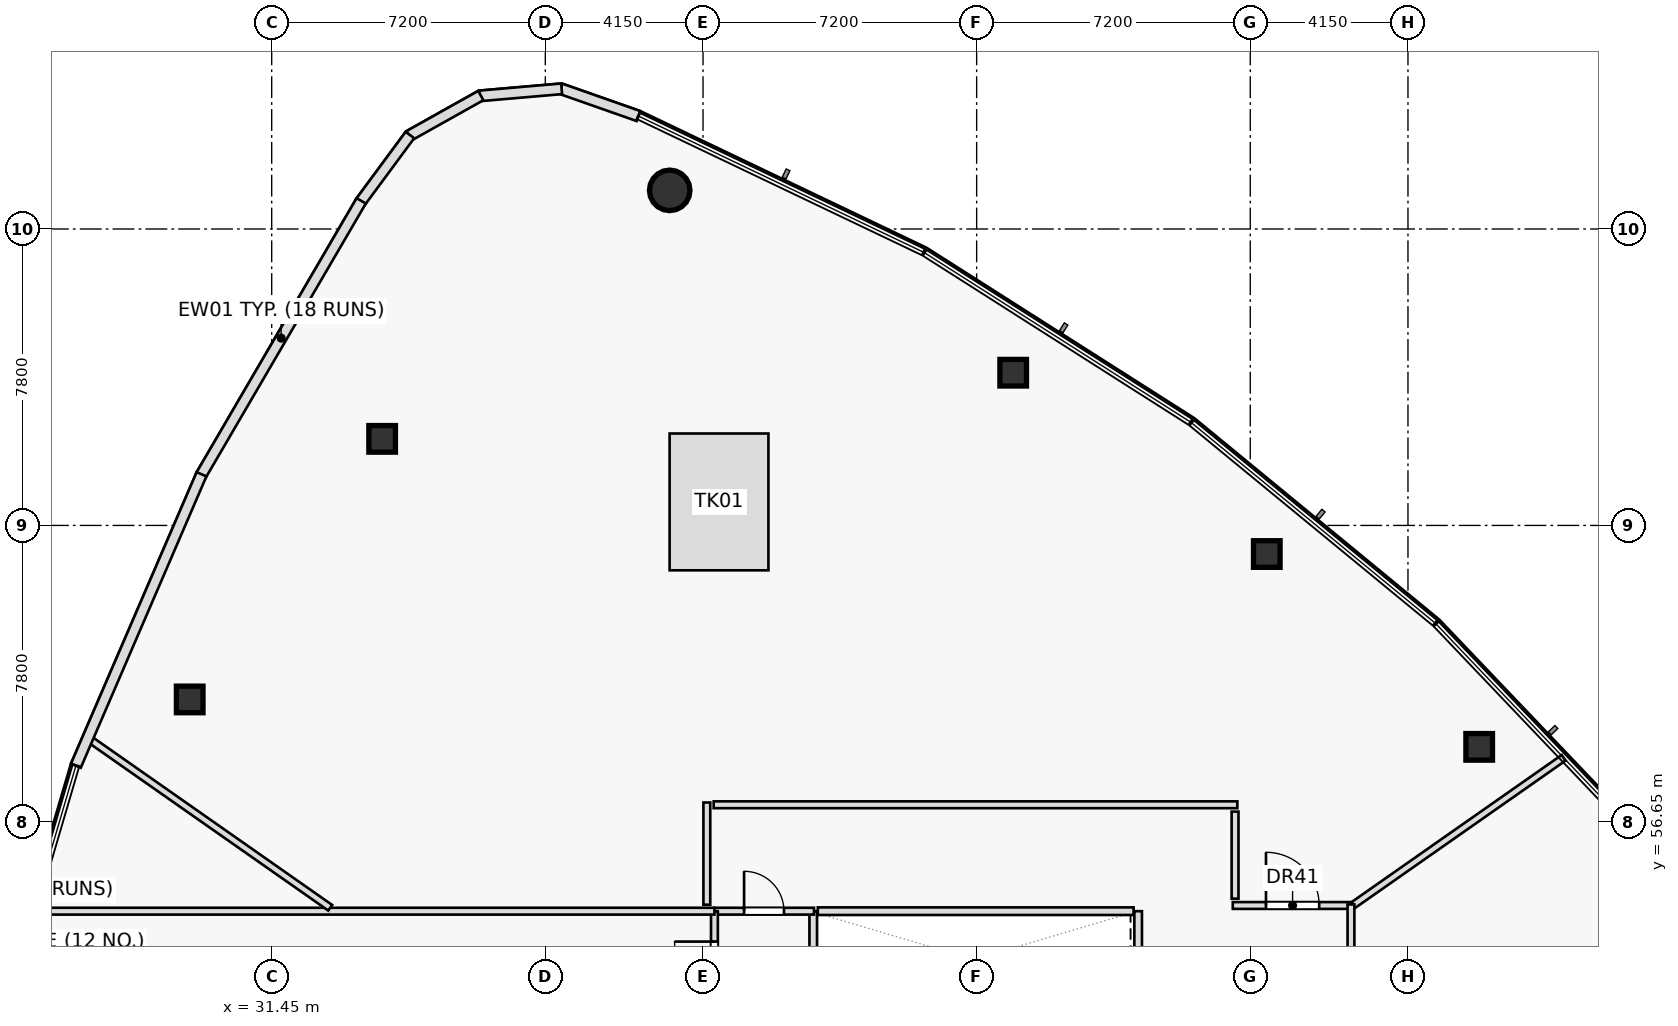
"""IFC4 building model, lengths in metres.
Left out: names, types, materials, properties, quantities, classifications, styles, units other than length and angle.
Written with IfcOpenShell. Run it as: python <this file> out.ifc"""

import sys

from ifc_helpers import new_model, si_unit, direction, frame, frame_2d, origin, origin_2d, place, context, subcontext, project, spatial, rectangle, hollow_rectangle, hollow_circle, extrude, element, fill, save


model = new_model("IFC4")
c1 = context("Model", 3, precision=1e-05, world=origin(), true_north=direction((0.0, 1.0)))
c2 = subcontext(c1, "Body", "Model", "MODEL_VIEW")
j1 = project(units=[si_unit("LENGTHUNIT", "METRE"), si_unit("PLANEANGLEUNIT", "RADIAN")], contexts=[c1])
p1 = place(None, origin())
s1 = spatial("IfcSite", under=j1, at=p1, CompositionType="ELEMENT")
p2 = place(p1, origin())
s2 = spatial("IfcBuilding", under=s1, at=p2, CompositionType="ELEMENT")
p3 = place(p2, frame((0.0, 0.0, 97.8)))
s3 = spatial("IfcBuildingStorey", under=s2, at=p3, CompositionType="ELEMENT", Elevation=97.8)
p4 = place(p3, frame((41.923, 73.266, 0.0), z_axis=(0.0, 0.0, 1.0), x_axis=(1.0, 0.0, 0.0)))
e1 = element("IfcColumn", 1, at=p4, inside=s3, PredefinedType="COLUMN", context=c2, shape_type="SweptSolid", body=[
    extrude(hollow_circle(Radius=0.533, WallThickness=0.045, at=origin_2d()), origin(), (0.0, 0.0, 1.0), 4.55),
])
for number, where, z_axis, x_axis in (
    (2, (34.356, 66.728, 0.0), (0.0, 0.0, 1.0), (1.0, 0.0, 0.0)),
    (3, (29.292, 59.872, 0.0), (0.0, 0.0, 1.0), (1.0, 0.0, 0.0)),
):
    element("IfcColumn", number, at=place(p3, frame(where, z_axis=z_axis, x_axis=x_axis)), inside=s3, PredefinedType="COLUMN", context=c2, shape_type="SweptSolid", body=[
        extrude(hollow_rectangle(XDim=0.7, YDim=0.7, WallThickness=0.04, at=origin_2d()), origin(), (0.0, 0.0, 1.0), 5.0),
    ])
for number, where, z_axis, x_axis in (
    (4, (63.224, 58.624, 0.0), (0.0, 0.0, 1.0), (1.0, 0.0, 0.0)),
    (5, (57.635, 63.698, 0.0), (0.0, 0.0, 1.0), (1.0, 0.0, 0.0)),
    (6, (50.962, 68.469, 0.0), (0.0, 0.0, 1.0), (1.0, 0.0, 0.0)),
):
    element("IfcColumn", number, at=place(p3, frame(where, z_axis=z_axis, x_axis=x_axis)), inside=s3, PredefinedType="COLUMN", context=c2, shape_type="SweptSolid", body=[
        extrude(hollow_rectangle(XDim=0.7, YDim=0.7, WallThickness=0.04, at=origin_2d()), origin(), (0.0, 0.0, 1.0), 4.55),
    ])
for number, where, z_axis, x_axis in (
    (7, (45.7, 51.8, 0.0), (0.0, 0.0, 1.0), (0.0, 1.0, 0.0)),
    (8, (54.25, 51.8, 0.0), (0.0, 0.0, 1.0), (0.0, 1.0, 0.0)),
):
    element("IfcWall", number, at=place(p3, frame(where, z_axis=z_axis, x_axis=x_axis)), inside=s3, PredefinedType="PARTITIONING", context=c2, shape_type="SweptSolid", body=[
        extrude(rectangle(XDim=2.5, YDim=0.2, at=frame_2d((1.25, 0.0))), origin(), (0.0, 0.0, 1.0), 4.55),
    ])
p5 = place(p3, frame((43.1, 54.3, 0.0), z_axis=(0.0, 0.0, 1.0), x_axis=(1.0, 0.0, 0.0)))
e9 = element("IfcWall", 9, at=p5, inside=s3, PredefinedType="PARTITIONING", context=c2, shape_type="SweptSolid", body=[
    extrude(rectangle(XDim=2.62, YDim=0.18, at=frame_2d((1.31, 0.0))), origin(), (0.0, 0.0, 1.0), 4.55),
])
p6 = place(p5, frame((0.78, 0.0, 0.0)))
e10 = element("IfcOpeningElement", 10, at=p6, cuts=e9, PredefinedType="OPENING", context=c2, shape_type="SweptSolid", body=[
    extrude(rectangle(XDim=1.05, YDim=2.2, at=frame_2d((0.525, 1.1))), frame((0.0, 0.1, 0.0), z_axis=(0.0, -1.0, 0.0), x_axis=(1.0, 0.0, 0.0)), (0.0, 0.0, 1.0), 0.2),
])
p7 = place(p3, frame((43.1, 51.8, 0.0), z_axis=(0.0, 0.0, 1.0), x_axis=(0.0, 1.0, 0.0)))
e11 = element("IfcWall", 11, at=p7, inside=s3, PredefinedType="PARTITIONING", context=c2, shape_type="SweptSolid", body=[
    extrude(rectangle(XDim=2.5, YDim=0.18, at=frame_2d((1.25, 0.0))), origin(), (0.0, 0.0, 1.0), 3.925),
])
p8 = place(p7, frame((0.65, 0.0, 0.0)))
e12 = element("IfcOpeningElement", 12, at=p8, cuts=e11, PredefinedType="OPENING", context=c2, shape_type="SweptSolid", body=[
    extrude(rectangle(XDim=1.05, YDim=2.2, at=frame_2d((0.525, 1.1))), frame((0.0, 0.1, 0.0), z_axis=(0.0, -1.0, 0.0), x_axis=(1.0, 0.0, 0.0)), (0.0, 0.0, 1.0), 0.2),
])
p9 = place(p3, frame((25.173, 54.3, 0.0), z_axis=(0.0, 0.0, 1.0), x_axis=(1.0, 0.0, 0.0)))
e13 = element("IfcWall", 13, at=p9, inside=s3, PredefinedType="PARTITIONING", context=c2, shape_type="SweptSolid", body=[
    extrude(rectangle(XDim=17.927, YDim=0.18, at=frame_2d((8.964, 0.0))), origin(), (0.0, 0.0, 1.0), 3.925),
])
p10 = place(p3, frame((59.85, 54.418, 0.0), z_axis=(0.0, 0.0, 1.0), x_axis=(0.819142926279, 0.573589457998, 0.0)))
e14 = element("IfcWall", 14, at=p10, inside=s3, PredefinedType="PARTITIONING", context=c2, shape_type="SweptSolid", body=[
    extrude(rectangle(XDim=6.832, YDim=0.18, at=frame_2d((3.416, 0.0))), origin(), (0.0, 0.0, 1.0), 3.975),
])
p11 = place(p3, frame((32.99, 54.39, 0.0), z_axis=(0.0, 0.0, 1.0), x_axis=(-0.819142061869, 0.57359069246, 0.0)))
e15 = element("IfcWall", 15, at=p11, inside=s3, PredefinedType="PARTITIONING", context=c2, shape_type="SweptSolid", body=[
    extrude(rectangle(XDim=7.787, YDim=0.18, at=frame_2d((3.894, 0.0))), origin(), (0.0, 0.0, 1.0), 3.975),
])
p12 = place(p3, frame((56.74, 54.45, 0.0), z_axis=(0.0, 0.0, 1.0), x_axis=(1.0, 0.0, 0.0)))
e16 = element("IfcWall", 16, at=p12, inside=s3, PredefinedType="PARTITIONING", context=c2, shape_type="SweptSolid", body=[
    extrude(rectangle(XDim=3.147, YDim=0.18, at=frame_2d((1.574, 0.0))), origin(), (0.0, 0.0, 1.0), 3.925),
])
p13 = place(p12, frame((0.874, 0.0, 0.0)))
e17 = element("IfcOpeningElement", 17, at=p13, cuts=e16, PredefinedType="OPENING", context=c2, shape_type="SweptSolid", body=[
    extrude(rectangle(XDim=1.4, YDim=2.15, at=frame_2d((0.7, 1.075))), frame((0.0, 0.1, 0.0), z_axis=(0.0, -1.0, 0.0), x_axis=(1.0, 0.0, 0.0)), (0.0, 0.0, 1.0), 0.2),
])
p14 = place(p3, frame((59.85, 54.478, 0.0), z_axis=(0.0, 0.0, 1.0), x_axis=(0.0, -1.0, 0.0)))
e18 = element("IfcWall", 18, at=p14, inside=s3, PredefinedType="PARTITIONING", context=c2, shape_type="SweptSolid", body=[
    extrude(rectangle(XDim=18.988, YDim=0.18, at=frame_2d((9.494, 0.0))), origin(), (0.0, 0.0, 1.0), 3.925),
])
p15 = place(p14, frame((8.794, 0.0, 0.0)))
e19 = element("IfcOpeningElement", 19, at=p15, cuts=e18, PredefinedType="OPENING", context=c2, shape_type="SweptSolid", body=[
    extrude(rectangle(XDim=1.4, YDim=2.15, at=frame_2d((0.7, 1.075))), frame((0.0, 0.1, 0.0), z_axis=(0.0, -1.0, 0.0), x_axis=(1.0, 0.0, 0.0)), (0.0, 0.0, 1.0), 0.2),
])
p16 = place(p3, frame((42.9, 54.47, 0.0), z_axis=(0.0, 0.0, 1.0), x_axis=(0.0, 1.0, 0.0)))
e20 = element("IfcWall", 20, at=p16, inside=s3, PredefinedType="PARTITIONING", context=c2, shape_type="SweptSolid", body=[
    extrude(rectangle(XDim=2.69, YDim=0.18, at=frame_2d((1.345, 0.0))), origin(), (0.0, 0.0, 1.0), 3.925),
])
p17 = place(p3, frame((43.08, 57.1, 0.0), z_axis=(0.0, 0.0, 1.0), x_axis=(1.0, 0.0, 0.0)))
e21 = element("IfcWall", 21, at=p17, inside=s3, PredefinedType="PARTITIONING", context=c2, shape_type="SweptSolid", body=[
    extrude(rectangle(XDim=13.78, YDim=0.18, at=frame_2d((6.89, 0.0))), origin(), (0.0, 0.0, 1.0), 3.925),
])
p18 = place(p3, frame((56.8, 56.92, 0.0), z_axis=(0.0, 0.0, 1.0), x_axis=(0.0, -1.0, 0.0)))
e22 = element("IfcWall", 22, at=p18, inside=s3, PredefinedType="PARTITIONING", context=c2, shape_type="SweptSolid", body=[
    extrude(rectangle(XDim=2.29, YDim=0.18, at=frame_2d((1.145, 0.0))), origin(), (0.0, 0.0, 1.0), 3.925),
])
p19 = place(p3, frame((41.101, 75.222, 0.0), z_axis=(0.0, 0.0, 1.0), x_axis=(-0.943509480912, 0.33134552876, 0.0)))
e23 = element("IfcWall", 23, at=p19, inside=s3, PredefinedType="STANDARD", context=c2, shape_type="SweptSolid", body=[
    extrude(rectangle(XDim=2.174, YDim=0.28, at=frame_2d((1.087, 0.0))), origin(), (0.0, 0.0, 1.0), 4.55),
])
p20 = place(p3, frame((39.079, 75.938, 0.0), z_axis=(0.0, 0.0, 1.0), x_axis=(-0.996272717401, -0.086259333193, 0.0)))
e24 = element("IfcWall", 24, at=p20, inside=s3, PredefinedType="STANDARD", context=c2, shape_type="SweptSolid", body=[
    extrude(rectangle(XDim=2.162, YDim=0.28, at=frame_2d((1.081, 0.0))), origin(), (0.0, 0.0, 1.0), 4.55),
])
p21 = place(p3, frame((36.952, 75.76, 0.0), z_axis=(0.0, 0.0, 1.0), x_axis=(-0.872517565839, -0.488582743557, 0.0)))
e25 = element("IfcWall", 25, at=p21, inside=s3, PredefinedType="STANDARD", context=c2, shape_type="SweptSolid", body=[
    extrude(rectangle(XDim=2.163, YDim=0.28, at=frame_2d((1.081, 0.0))), origin(), (0.0, 0.0, 1.0), 4.55),
])
p22 = place(p3, frame((35.087, 74.723, 0.0), z_axis=(0.0, 0.0, 1.0), x_axis=(-0.594048589396, -0.804429159987, 0.0)))
e26 = element("IfcWall", 26, at=p22, inside=s3, PredefinedType="STANDARD", context=c2, shape_type="SweptSolid", body=[
    extrude(rectangle(XDim=2.185, YDim=0.28, at=frame_2d((1.093, 0.0))), origin(), (0.0, 0.0, 1.0), 4.55),
])
p23 = place(p3, frame((33.805, 72.99, 0.0), z_axis=(0.0, 0.0, 1.0), x_axis=(-0.504174194544, -0.863601980982, 0.0)))
e27 = element("IfcWall", 27, at=p23, inside=s3, PredefinedType="STANDARD", context=c2, shape_type="SweptSolid", body=[
    extrude(rectangle(XDim=8.361, YDim=0.28, at=frame_2d((4.18, 0.0))), origin(), (0.0, 0.0, 1.0), 4.55),
])
p24 = place(p3, frame((29.604, 65.797, 0.0), z_axis=(0.0, 0.0, 1.0), x_axis=(-0.395958170162, -0.918268548673, 0.0)))
e28 = element("IfcWall", 28, at=p24, inside=s3, PredefinedType="STANDARD", context=c2, shape_type="SweptSolid", body=[
    extrude(rectangle(XDim=8.349, YDim=0.28, at=frame_2d((4.175, 0.0))), origin(), (0.0, 0.0, 1.0), 4.55),
])
p25 = place(p3, frame((45.82, 54.3, 0.0), z_axis=(0.0, 0.0, 1.0), x_axis=(1.0, 0.0, 0.0)))
e29 = element("IfcWall", 29, at=p25, inside=s3, PredefinedType="PARTITIONING", context=c2, shape_type="SweptSolid", body=[
    extrude(rectangle(XDim=8.31, YDim=0.2, at=frame_2d((4.155, 0.0))), origin(), (0.0, 0.0, 1.0), 4.55),
])
p26 = place(p6, origin())
e30 = element("IfcDoor", 30, at=p26, inside=s3, OperationType="SINGLE_SWING_LEFT", PredefinedType="DOOR", context=c2, shape_type="SweptSolid", body=[
    extrude(rectangle(XDim=1.05, YDim=2.2, at=frame_2d((0.525, 1.1))), frame((0.0, 0.025, 0.0), z_axis=(0.0, -1.0, 0.0), x_axis=(1.0, 0.0, 0.0)), (0.0, 0.0, 1.0), 0.05),
])
fill(e10, e30)
p27 = place(p8, origin())
e31 = element("IfcDoor", 31, at=p27, inside=s3, OperationType="SINGLE_SWING_RIGHT", PredefinedType="DOOR", context=c2, shape_type="SweptSolid", body=[
    extrude(rectangle(XDim=1.05, YDim=2.2, at=frame_2d((0.525, 1.1))), frame((0.0, 0.025, 0.0), z_axis=(0.0, -1.0, 0.0), x_axis=(1.0, 0.0, 0.0)), (0.0, 0.0, 1.0), 0.05),
])
fill(e12, e31)
p28 = place(p13, origin())
e32 = element("IfcDoor", 32, at=p28, inside=s3, OperationType="SINGLE_SWING_LEFT", PredefinedType="DOOR", context=c2, shape_type="SweptSolid", body=[
    extrude(rectangle(XDim=1.4, YDim=2.15, at=frame_2d((0.7, 1.075))), frame((0.0, 0.025, 0.0), z_axis=(0.0, -1.0, 0.0), x_axis=(1.0, 0.0, 0.0)), (0.0, 0.0, 1.0), 0.05),
])
fill(e17, e32)
save(model, sys.argv[1])
